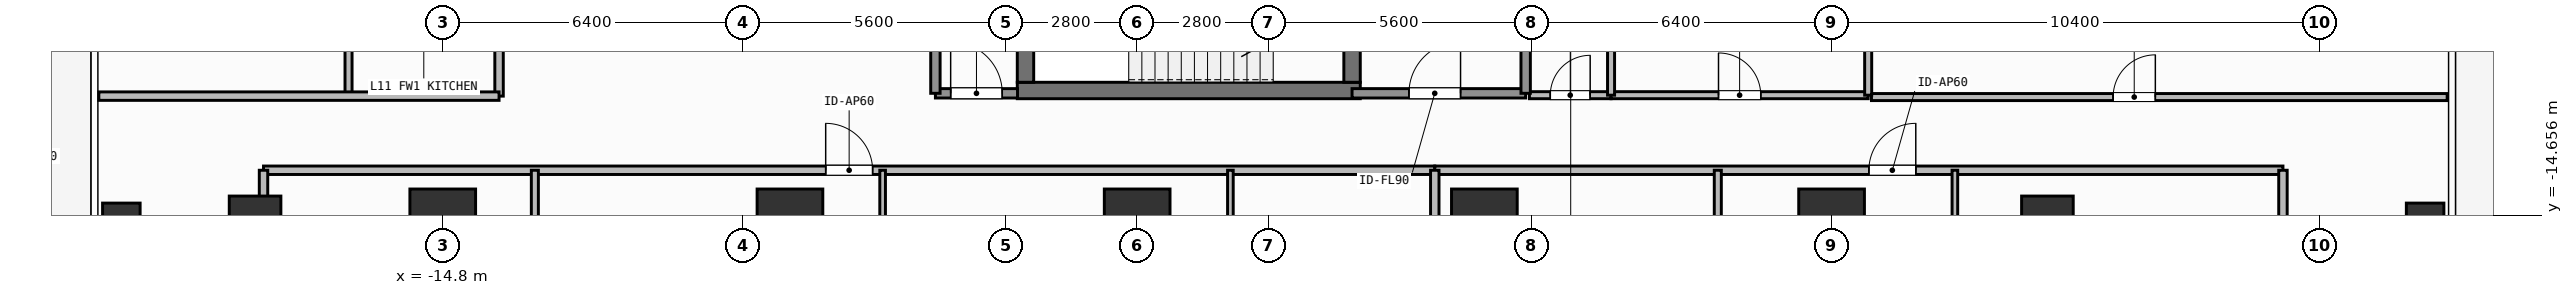
"""IFC4 building model, lengths in metres.
Left out: names, types, materials, properties, quantities, classifications, styles, units other than length and angle.
Written with IfcOpenShell. Run it as: python <this file> out.ifc"""

import sys

from ifc_helpers import new_model, si_unit, direction, frame, frame_2d, origin, origin_2d, place, context, subcontext, project, spatial, rectangle, hollow_rectangle, extrude, element, fill, save


model = new_model("IFC4")
c1 = context("Model", 3, precision=1e-05, world=origin(), true_north=direction((0.0, 1.0)))
c2 = subcontext(c1, "Body", "Model", "MODEL_VIEW")
j1 = project(units=[si_unit("LENGTHUNIT", "METRE"), si_unit("PLANEANGLEUNIT", "RADIAN")], contexts=[c1])
p1 = place(None, origin())
s1 = spatial("IfcSite", under=j1, at=p1, CompositionType="ELEMENT")
p2 = place(p1, origin())
s2 = spatial("IfcBuilding", under=s1, at=p2, CompositionType="ELEMENT")
p3 = place(p2, frame((0.0, 0.0, 42.3)))
s3 = spatial("IfcBuildingStorey", under=s2, at=p3, CompositionType="ELEMENT", Elevation=42.3)
p4 = place(p3, frame((-2.555, -12.0, 0.0), z_axis=(0.0, 0.0, 1.0), x_axis=(1.0, 0.0, 0.0)))
e1 = element("IfcWall", 1, at=p4, inside=s3, PredefinedType="SHEAR", context=c2, shape_type="SweptSolid", body=[
    extrude(rectangle(XDim=7.31, YDim=0.35, at=frame_2d((3.655, 0.0))), origin(), (0.0, 0.0, 1.0), 3.9),
])
p5 = place(p3, frame((-2.38, -11.825, 0.0), z_axis=(0.0, 0.0, 1.0), x_axis=(0.0, 1.0, 0.0)))
e2 = element("IfcWall", 2, at=p5, inside=s3, PredefinedType="SHEAR", context=c2, shape_type="SweptSolid", body=[
    extrude(rectangle(XDim=2.925, YDim=0.35, at=frame_2d((1.462, 0.0))), origin(), (0.0, 0.0, 1.0), 3.9),
])
p6 = place(p3, frame((4.58, -8.9, 0.0), z_axis=(0.0, 0.0, 1.0), x_axis=(0.0, -1.0, 0.0)))
e3 = element("IfcWall", 3, at=p6, inside=s3, PredefinedType="SHEAR", context=c2, shape_type="SweptSolid", body=[
    extrude(rectangle(XDim=2.925, YDim=0.35, at=frame_2d((1.462, 0.0))), origin(), (0.0, 0.0, 1.0), 3.9),
])
p7 = place(p6, frame((0.913, 0.0, 0.0)))
e4 = element("IfcOpeningElement", 4, at=p7, cuts=e3, PredefinedType="OPENING", context=c2, shape_type="SweptSolid", body=[
    extrude(rectangle(XDim=1.1, YDim=2.15, at=frame_2d((0.55, 1.075))), frame((0.0, 0.185, 0.0), z_axis=(0.0, -1.0, 0.0), x_axis=(1.0, 0.0, 0.0)), (0.0, 0.0, 1.0), 0.37),
])
for number, where, z_axis, x_axis in (
    (5, (-14.8, -14.8, 0.0), (0.0, 0.0, 1.0), (1.0, 0.0, 0.0)),
    (6, (-7.4, -14.8, 0.0), (0.0, 0.0, 1.0), (1.0, 0.0, 0.0)),
    (7, (0.0, -14.8, 0.0), (0.0, 0.0, 1.0), (1.0, 0.0, 0.0)),
    (8, (7.4, -14.8, 0.0), (0.0, 0.0, 1.0), (1.0, 0.0, 0.0)),
    (9, (14.8, -14.8, 0.0), (0.0, 0.0, 1.0), (1.0, 0.0, 0.0)),
):
    element("IfcColumn", number, at=place(p3, frame(where, z_axis=z_axis, x_axis=x_axis)), inside=s3, PredefinedType="COLUMN", context=c2, shape_type="SweptSolid", body=[
        extrude(rectangle(XDim=1.4, YDim=1.4, at=origin_2d()), origin(), (0.0, 0.0, 1.0), 3.9),
    ])
for number, where, z_axis, x_axis in (
    (10, (-18.8, -14.8, 0.0), (0.0, 0.0, 1.0), (1.0, 0.0, 0.0)),
    (11, (19.4, -14.8, 0.0), (0.0, 0.0, 1.0), (1.0, 0.0, 0.0)),
):
    element("IfcColumn", number, at=place(p3, frame(where, z_axis=z_axis, x_axis=x_axis)), inside=s3, PredefinedType="COLUMN", context=c2, shape_type="SweptSolid", body=[
        extrude(rectangle(XDim=1.1, YDim=1.1, at=origin_2d()), origin(), (0.0, 0.0, 1.0), 3.9),
    ])
for number, where, z_axis, x_axis in (
    (12, (-21.65, -14.8, 0.0), (0.0, 0.0, 1.0), (1.0, 0.0, 0.0)),
    (13, (27.45, -14.8, 0.0), (0.0, 0.0, 1.0), (1.0, 0.0, 0.0)),
):
    element("IfcColumn", number, at=place(p3, frame(where, z_axis=z_axis, x_axis=x_axis)), inside=s3, PredefinedType="COLUMN", context=c2, shape_type="SweptSolid", body=[
        extrude(hollow_rectangle(XDim=0.8, YDim=0.8, WallThickness=0.036, at=origin_2d()), origin(), (0.0, 0.0, 1.0), 3.9),
    ])
p8 = place(p3, frame((4.58, -12.06, 0.0), z_axis=(0.0, 0.0, 1.0), x_axis=(1.0, 0.0, 0.0)))
e14 = element("IfcWall", 14, at=p8, inside=s3, PredefinedType="SOLIDWALL", context=c2, shape_type="SweptSolid", body=[
    extrude(rectangle(XDim=3.7, YDim=0.2, at=frame_2d((1.85, 0.0))), origin(), (0.0, 0.0, 1.0), 3.68),
])
p9 = place(p8, frame((1.212, 0.0, 0.0)))
e15 = element("IfcOpeningElement", 15, at=p9, cuts=e14, PredefinedType="OPENING", context=c2, shape_type="SweptSolid", body=[
    extrude(rectangle(XDim=1.1, YDim=2.15, at=frame_2d((0.55, 1.075))), frame((0.0, 0.11, 0.0), z_axis=(0.0, -1.0, 0.0), x_axis=(1.0, 0.0, 0.0)), (0.0, 0.0, 1.0), 0.22),
])
p10 = place(p3, frame((-4.3, -12.06, 0.0), z_axis=(0.0, 0.0, 1.0), x_axis=(1.0, 0.0, 0.0)))
e16 = element("IfcWall", 16, at=p10, inside=s3, PredefinedType="SOLIDWALL", context=c2, shape_type="SweptSolid", body=[
    extrude(rectangle(XDim=1.75, YDim=0.2, at=frame_2d((0.875, 0.0))), origin(), (0.0, 0.0, 1.0), 3.68),
])
p11 = place(p10, frame((0.325, 0.0, 0.0)))
e17 = element("IfcOpeningElement", 17, at=p11, cuts=e16, PredefinedType="OPENING", context=c2, shape_type="SweptSolid", body=[
    extrude(rectangle(XDim=1.1, YDim=2.15, at=frame_2d((0.55, 1.075))), frame((0.0, 0.11, 0.0), z_axis=(0.0, -1.0, 0.0), x_axis=(1.0, 0.0, 0.0)), (0.0, 0.0, 1.0), 0.22),
])
p12 = place(p3, frame((8.36, -12.1, 0.0), z_axis=(0.0, 0.0, 1.0), x_axis=(1.0, 0.0, 0.0)))
e18 = element("IfcWall", 18, at=p12, inside=s3, PredefinedType="PARTITIONING", context=c2, shape_type="SweptSolid", body=[
    extrude(rectangle(XDim=1.74, YDim=0.15, at=frame_2d((0.87, 0.0))), origin(), (0.0, 0.0, 1.0), 3.68),
])
p13 = place(p12, frame((0.445, 0.0, 0.0)))
e19 = element("IfcOpeningElement", 19, at=p13, cuts=e18, PredefinedType="OPENING", context=c2, shape_type="SweptSolid", body=[
    extrude(rectangle(XDim=0.85, YDim=2.1, at=frame_2d((0.425, 1.05))), frame((0.0, 0.085, 0.0), z_axis=(0.0, -1.0, 0.0), x_axis=(1.0, 0.0, 0.0)), (0.0, 0.0, 1.0), 0.17),
])
p14 = place(p3, frame((10.1, -12.1, 0.0), z_axis=(0.0, 0.0, 1.0), x_axis=(1.0, 0.0, 0.0)))
e20 = element("IfcWall", 20, at=p14, inside=s3, PredefinedType="PARTITIONING", context=c2, shape_type="SweptSolid", body=[
    extrude(rectangle(XDim=5.48, YDim=0.15, at=frame_2d((2.74, 0.0))), origin(), (0.0, 0.0, 1.0), 3.68),
])
p15 = place(p14, frame((2.29, 0.0, 0.0)))
e21 = element("IfcOpeningElement", 21, at=p15, cuts=e20, PredefinedType="OPENING", context=c2, shape_type="SweptSolid", body=[
    extrude(rectangle(XDim=0.9, YDim=2.1, at=frame_2d((0.45, 1.05))), frame((0.0, 0.085, 0.0), z_axis=(0.0, -1.0, 0.0), x_axis=(1.0, 0.0, 0.0)), (0.0, 0.0, 1.0), 0.17),
])
p16 = place(p3, frame((-18.62, -13.7, 0.0), z_axis=(0.0, 0.0, 1.0), x_axis=(1.0, 0.0, 0.0)))
e22 = element("IfcWall", 22, at=p16, inside=s3, PredefinedType="PARTITIONING", context=c2, shape_type="SweptSolid", body=[
    extrude(rectangle(XDim=24.963, YDim=0.18, at=frame_2d((12.481, 0.0))), origin(), (0.0, 0.0, 1.0), 3.68),
])
p17 = place(p16, frame((11.981, 0.0, 0.0)))
e23 = element("IfcOpeningElement", 23, at=p17, cuts=e22, PredefinedType="OPENING", context=c2, shape_type="SweptSolid", body=[
    extrude(rectangle(XDim=1.0, YDim=2.2, at=frame_2d((0.5, 1.1))), frame((0.0, 0.1, 0.0), z_axis=(0.0, -1.0, 0.0), x_axis=(1.0, 0.0, 0.0)), (0.0, 0.0, 1.0), 0.2),
])
p18 = place(p3, frame((-5.425, -20.79, 0.0), z_axis=(0.0, 0.0, 1.0), x_axis=(0.0, 1.0, 0.0)))
e24 = element("IfcWall", 24, at=p18, inside=s3, PredefinedType="PARTITIONING", context=c2, shape_type="SweptSolid", body=[
    extrude(rectangle(XDim=7.09, YDim=0.12, at=frame_2d((3.545, 0.0))), origin(), (0.0, 0.0, 1.0), 3.68),
])
p19 = place(p18, frame((2.117, 0.0, 0.0)))
e25 = element("IfcOpeningElement", 25, at=p19, cuts=e24, PredefinedType="OPENING", context=c2, shape_type="SweptSolid", body=[
    extrude(rectangle(XDim=0.9, YDim=2.1, at=frame_2d((0.45, 1.05))), frame((0.0, 0.07, 0.0), z_axis=(0.0, -1.0, 0.0), x_axis=(1.0, 0.0, 0.0)), (0.0, 0.0, 1.0), 0.14),
])
p20 = place(p3, frame((-12.837, -20.79, 0.0), z_axis=(0.0, 0.0, 1.0), x_axis=(0.0, 1.0, 0.0)))
e26 = element("IfcWall", 26, at=p20, inside=s3, PredefinedType="PARTITIONING", context=c2, shape_type="SweptSolid", body=[
    extrude(rectangle(XDim=7.09, YDim=0.15, at=frame_2d((3.545, 0.0))), origin(), (0.0, 0.0, 1.0), 3.68),
])
p21 = place(p20, frame((2.133, 0.0, 0.0)))
e27 = element("IfcOpeningElement", 27, at=p21, cuts=e26, PredefinedType="OPENING", context=c2, shape_type="SweptSolid", body=[
    extrude(rectangle(XDim=0.85, YDim=2.1, at=frame_2d((0.425, 1.05))), frame((0.0, 0.085, 0.0), z_axis=(0.0, -1.0, 0.0), x_axis=(1.0, 0.0, 0.0)), (0.0, 0.0, 1.0), 0.17),
])
p22 = place(p3, frame((1.987, -18.663, 0.0), z_axis=(0.0, 0.0, 1.0), x_axis=(0.0, 1.0, 0.0)))
e28 = element("IfcWall", 28, at=p22, inside=s3, PredefinedType="PARTITIONING", context=c2, shape_type="SweptSolid", body=[
    extrude(rectangle(XDim=4.963, YDim=0.12, at=frame_2d((2.481, 0.0))), origin(), (0.0, 0.0, 1.0), 3.68),
])
p23 = place(p22, frame((2.056, 0.0, 0.0)))
e29 = element("IfcOpeningElement", 29, at=p23, cuts=e28, PredefinedType="OPENING", context=c2, shape_type="SweptSolid", body=[
    extrude(rectangle(XDim=0.85, YDim=2.1, at=frame_2d((0.425, 1.05))), frame((0.0, 0.07, 0.0), z_axis=(0.0, -1.0, 0.0), x_axis=(1.0, 0.0, 0.0)), (0.0, 0.0, 1.0), 0.14),
])
p24 = place(p3, frame((6.343, -13.7, 0.0), z_axis=(0.0, 0.0, 1.0), x_axis=(1.0, 0.0, 0.0)))
e30 = element("IfcWall", 30, at=p24, inside=s3, PredefinedType="PARTITIONING", context=c2, shape_type="SweptSolid", body=[
    extrude(rectangle(XDim=18.077, YDim=0.18, at=frame_2d((9.039, 0.0))), origin(), (0.0, 0.0, 1.0), 3.68),
])
p25 = place(p24, frame((9.252, 0.0, 0.0)))
e31 = element("IfcOpeningElement", 31, at=p25, cuts=e30, PredefinedType="OPENING", context=c2, shape_type="SweptSolid", body=[
    extrude(rectangle(XDim=1.0, YDim=2.2, at=frame_2d((0.5, 1.1))), frame((0.0, 0.1, 0.0), z_axis=(0.0, -1.0, 0.0), x_axis=(1.0, 0.0, 0.0)), (0.0, 0.0, 1.0), 0.2),
])
p26 = place(p3, frame((12.375, -20.79, 0.0), z_axis=(0.0, 0.0, 1.0), x_axis=(0.0, 1.0, 0.0)))
e32 = element("IfcWall", 32, at=p26, inside=s3, PredefinedType="PARTITIONING", context=c2, shape_type="SweptSolid", body=[
    extrude(rectangle(XDim=7.09, YDim=0.15, at=frame_2d((3.545, 0.0))), origin(), (0.0, 0.0, 1.0), 3.68),
])
p27 = place(p26, frame((3.03, 0.0, 0.0)))
e33 = element("IfcOpeningElement", 33, at=p27, cuts=e32, PredefinedType="OPENING", context=c2, shape_type="SweptSolid", body=[
    extrude(rectangle(XDim=0.85, YDim=2.1, at=frame_2d((0.425, 1.05))), frame((0.0, 0.085, 0.0), z_axis=(0.0, -1.0, 0.0), x_axis=(1.0, 0.0, 0.0)), (0.0, 0.0, 1.0), 0.17),
])
p28 = place(p3, frame((17.428, -17.883, 0.0), z_axis=(0.0, 0.0, 1.0), x_axis=(0.0, 1.0, 0.0)))
e34 = element("IfcWall", 34, at=p28, inside=s3, PredefinedType="PARTITIONING", context=c2, shape_type="SweptSolid", body=[
    extrude(rectangle(XDim=4.183, YDim=0.12, at=frame_2d((2.092, 0.0))), origin(), (0.0, 0.0, 1.0), 3.68),
])
p29 = place(p28, frame((1.578, 0.0, 0.0)))
e35 = element("IfcOpeningElement", 35, at=p29, cuts=e34, PredefinedType="OPENING", context=c2, shape_type="SweptSolid", body=[
    extrude(rectangle(XDim=0.85, YDim=2.1, at=frame_2d((0.425, 1.05))), frame((0.0, 0.07, 0.0), z_axis=(0.0, -1.0, 0.0), x_axis=(1.0, 0.0, 0.0)), (0.0, 0.0, 1.0), 0.14),
])
p30 = place(p3, frame((-13.6, -12.12, 0.0), z_axis=(0.0, 0.0, 1.0), x_axis=(0.0, 1.0, 0.0)))
e36 = element("IfcWall", 36, at=p30, inside=s3, PredefinedType="PARTITIONING", context=c2, shape_type="SweptSolid", body=[
    extrude(rectangle(XDim=24.24, YDim=0.18, at=frame_2d((12.12, 0.0))), origin(), (0.0, 0.0, 1.0), 3.68),
])
p31 = place(p30, frame((9.829, 0.0, 0.0)))
e37 = element("IfcOpeningElement", 37, at=p31, cuts=e36, PredefinedType="OPENING", context=c2, shape_type="SweptSolid", body=[
    extrude(rectangle(XDim=1.0, YDim=2.2, at=frame_2d((0.5, 1.1))), frame((0.0, 0.1, 0.0), z_axis=(0.0, -1.0, 0.0), x_axis=(1.0, 0.0, 0.0)), (0.0, 0.0, 1.0), 0.2),
])
p32 = place(p3, frame((15.65, -12.14, 0.0), z_axis=(0.0, 0.0, 1.0), x_axis=(1.0, 0.0, 0.0)))
e38 = element("IfcWall", 38, at=p32, inside=s3, PredefinedType="PARTITIONING", context=c2, shape_type="SweptSolid", body=[
    extrude(rectangle(XDim=12.27, YDim=0.15, at=frame_2d((6.135, 0.0))), origin(), (0.0, 0.0, 1.0), 3.68),
])
p33 = place(p32, frame((5.15, 0.0, 0.0)))
e39 = element("IfcOpeningElement", 39, at=p33, cuts=e38, PredefinedType="OPENING", context=c2, shape_type="SweptSolid", body=[
    extrude(rectangle(XDim=0.9, YDim=2.1, at=frame_2d((0.45, 1.05))), frame((0.0, 0.085, 0.0), z_axis=(0.0, -1.0, 0.0), x_axis=(1.0, 0.0, 0.0)), (0.0, 0.0, 1.0), 0.17),
])
for number, where, z_axis, x_axis in (
    (40, (8.28, -12.06, 0.0), (0.0, 0.0, 1.0), (0.0, 1.0, 0.0)),
    (41, (-4.3, -12.06, 0.0), (0.0, 0.0, 1.0), (0.0, 1.0, 0.0)),
):
    element("IfcWall", number, at=place(p3, frame(where, z_axis=z_axis, x_axis=x_axis)), inside=s3, PredefinedType="SOLIDWALL", context=c2, shape_type="SweptSolid", body=[
        extrude(rectangle(XDim=3.11, YDim=0.2, at=frame_2d((1.555, 0.0))), origin(), (0.0, 0.0, 1.0), 3.68),
    ])
p34 = place(p3, frame((10.1, -12.1, 0.0), z_axis=(0.0, 0.0, 1.0), x_axis=(0.0, 1.0, 0.0)))
e42 = element("IfcWall", 42, at=p34, inside=s3, PredefinedType="PARTITIONING", context=c2, shape_type="SweptSolid", body=[
    extrude(rectangle(XDim=2.35, YDim=0.15, at=frame_2d((1.175, 0.0))), origin(), (0.0, 0.0, 1.0), 3.68),
])
p35 = place(p3, frame((15.58, -12.1, 0.0), z_axis=(0.0, 0.0, 1.0), x_axis=(0.0, 1.0, 0.0)))
e43 = element("IfcWall", 43, at=p35, inside=s3, PredefinedType="PARTITIONING", context=c2, shape_type="SweptSolid", body=[
    extrude(rectangle(XDim=6.25, YDim=0.15, at=frame_2d((3.125, 0.0))), origin(), (0.0, 0.0, 1.0), 3.68),
])
p36 = place(p3, frame((-18.62, -23.91, 0.0), z_axis=(0.0, 0.0, 1.0), x_axis=(0.0, 1.0, 0.0)))
e44 = element("IfcWall", 44, at=p36, inside=s3, PredefinedType="PARTITIONING", context=c2, shape_type="SweptSolid", body=[
    extrude(rectangle(XDim=10.21, YDim=0.18, at=frame_2d((5.105, 0.0))), origin(), (0.0, 0.0, 1.0), 3.082),
])
p37 = place(p3, frame((24.42, -23.91, 0.0), z_axis=(0.0, 0.0, 1.0), x_axis=(0.0, 1.0, 0.0)))
e45 = element("IfcWall", 45, at=p37, inside=s3, PredefinedType="PARTITIONING", context=c2, shape_type="SweptSolid", body=[
    extrude(rectangle(XDim=10.21, YDim=0.18, at=frame_2d((5.105, 0.0))), origin(), (0.0, 0.0, 1.0), 3.68),
])
p38 = place(p3, frame((6.343, -25.03, 0.0), z_axis=(0.0, 0.0, 1.0), x_axis=(0.0, 1.0, 0.0)))
e46 = element("IfcWall", 46, at=p38, inside=s3, PredefinedType="PARTITIONING", context=c2, shape_type="SweptSolid", body=[
    extrude(rectangle(XDim=11.33, YDim=0.18, at=frame_2d((5.665, 0.0))), origin(), (0.0, 0.0, 1.0), 3.68),
])
p39 = place(p3, frame((-16.808, -12.12, 0.0), z_axis=(0.0, 0.0, 1.0), x_axis=(0.0, 1.0, 0.0)))
e47 = element("IfcWall", 47, at=p39, inside=s3, PredefinedType="PARTITIONING", context=c2, shape_type="SweptSolid", body=[
    extrude(rectangle(XDim=2.8, YDim=0.15, at=frame_2d((1.4, 0.0))), origin(), (0.0, 0.0, 1.0), 3.68),
])
p40 = place(p3, frame((-22.13, -12.12, 0.0), z_axis=(0.0, 0.0, 1.0), x_axis=(1.0, 0.0, 0.0)))
e48 = element("IfcWall", 48, at=p40, inside=s3, PredefinedType="PARTITIONING", context=c2, shape_type="SweptSolid", body=[
    extrude(rectangle(XDim=8.53, YDim=0.18, at=frame_2d((4.265, 0.0))), origin(), (0.0, 0.0, 1.0), 3.68),
])
p41 = place(p9, origin())
e49 = element("IfcDoor", 49, at=p41, inside=s3, OperationType="SINGLE_SWING_RIGHT", PredefinedType="DOOR", context=c2, shape_type="SweptSolid", body=[
    extrude(rectangle(XDim=1.1, YDim=2.15, at=frame_2d((0.55, 1.075))), frame((0.0, 0.025, 0.0), z_axis=(0.0, -1.0, 0.0), x_axis=(1.0, 0.0, 0.0)), (0.0, 0.0, 1.0), 0.05),
])
fill(e15, e49)
p42 = place(p11, origin())
e50 = element("IfcDoor", 50, at=p42, inside=s3, OperationType="SINGLE_SWING_LEFT", PredefinedType="DOOR", context=c2, shape_type="SweptSolid", body=[
    extrude(rectangle(XDim=1.1, YDim=2.15, at=frame_2d((0.55, 1.075))), frame((0.0, 0.025, 0.0), z_axis=(0.0, -1.0, 0.0), x_axis=(1.0, 0.0, 0.0)), (0.0, 0.0, 1.0), 0.05),
])
fill(e17, e50)
p43 = place(p13, origin())
e51 = element("IfcDoor", 51, at=p43, inside=s3, OperationType="SINGLE_SWING_RIGHT", PredefinedType="DOOR", context=c2, shape_type="SweptSolid", body=[
    extrude(rectangle(XDim=0.85, YDim=2.1, at=frame_2d((0.425, 1.05))), frame((0.0, 0.025, 0.0), z_axis=(0.0, -1.0, 0.0), x_axis=(1.0, 0.0, 0.0)), (0.0, 0.0, 1.0), 0.05),
])
fill(e19, e51)
p44 = place(p15, origin())
e52 = element("IfcDoor", 52, at=p44, inside=s3, OperationType="SINGLE_SWING_LEFT", PredefinedType="DOOR", context=c2, shape_type="SweptSolid", body=[
    extrude(rectangle(XDim=0.9, YDim=2.1, at=frame_2d((0.45, 1.05))), frame((0.0, 0.025, 0.0), z_axis=(0.0, -1.0, 0.0), x_axis=(1.0, 0.0, 0.0)), (0.0, 0.0, 1.0), 0.05),
])
fill(e21, e52)
p45 = place(p17, origin())
e53 = element("IfcDoor", 53, at=p45, inside=s3, OperationType="SINGLE_SWING_LEFT", PredefinedType="DOOR", context=c2, shape_type="SweptSolid", body=[
    extrude(rectangle(XDim=1.0, YDim=2.2, at=frame_2d((0.5, 1.1))), frame((0.0, 0.025, 0.0), z_axis=(0.0, -1.0, 0.0), x_axis=(1.0, 0.0, 0.0)), (0.0, 0.0, 1.0), 0.05),
])
fill(e23, e53)
p46 = place(p25, origin())
e54 = element("IfcDoor", 54, at=p46, inside=s3, OperationType="SINGLE_SWING_RIGHT", PredefinedType="DOOR", context=c2, shape_type="SweptSolid", body=[
    extrude(rectangle(XDim=1.0, YDim=2.2, at=frame_2d((0.5, 1.1))), frame((0.0, 0.025, 0.0), z_axis=(0.0, -1.0, 0.0), x_axis=(1.0, 0.0, 0.0)), (0.0, 0.0, 1.0), 0.05),
])
fill(e31, e54)
p47 = place(p33, origin())
e55 = element("IfcDoor", 55, at=p47, inside=s3, OperationType="SINGLE_SWING_RIGHT", PredefinedType="DOOR", context=c2, shape_type="SweptSolid", body=[
    extrude(rectangle(XDim=0.9, YDim=2.1, at=frame_2d((0.45, 1.05))), frame((0.0, 0.025, 0.0), z_axis=(0.0, -1.0, 0.0), x_axis=(1.0, 0.0, 0.0)), (0.0, 0.0, 1.0), 0.05),
])
fill(e39, e55)
save(model, sys.argv[1])
